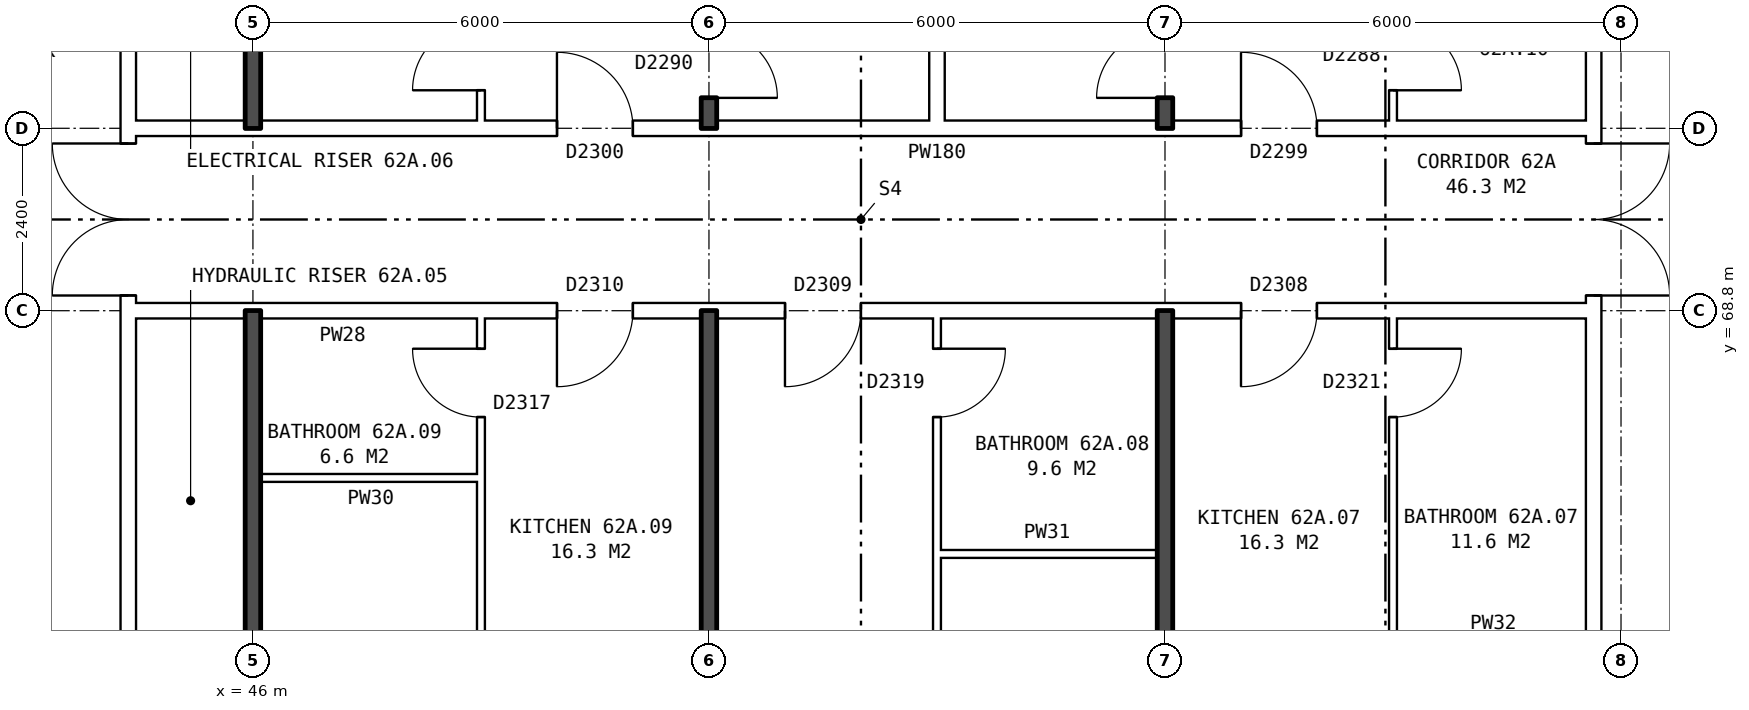
"""IFC4 building model, lengths in metres.
Left out: names, types, materials, properties, quantities, classifications, styles, units other than length and angle.
Written with IfcOpenShell. Run it as: python <this file> out.ifc"""

import sys

from ifc_helpers import new_model, si_unit, direction, frame, frame_2d, origin, place, context, subcontext, project, spatial, rectangle, extrude, element, fill, save


model = new_model("IFC4")
c1 = context("Model", 3, precision=1e-05, world=origin(), true_north=direction((0.0, 1.0)))
c2 = subcontext(c1, "Body", "Model", "MODEL_VIEW")
j1 = project(units=[si_unit("LENGTHUNIT", "METRE"), si_unit("PLANEANGLEUNIT", "RADIAN")], contexts=[c1])
p1 = place(None, origin())
s1 = spatial("IfcSite", under=j1, at=p1, CompositionType="ELEMENT")
p2 = place(p1, origin())
s2 = spatial("IfcBuilding", under=s1, at=p2, CompositionType="ELEMENT")
p3 = place(p2, frame((0.0, 0.0, 221.4)))
s3 = spatial("IfcBuildingStorey", under=s2, at=p3, CompositionType="ELEMENT", Elevation=221.4)
p4 = place(p3, frame((63.64, 63.9, 0.0), z_axis=(0.0, 0.0, 1.0), x_axis=(0.0, 1.0, 0.0)))
e1 = element("IfcWall", 1, at=p4, inside=s3, PredefinedType="PARTITIONING", context=c2, shape_type="SweptSolid", body=[
    extrude(rectangle(XDim=12.2, YDim=0.2, at=frame_2d((6.1, 0.0))), origin(), (0.0, 0.0, 1.0), 2.85),
])
p5 = place(p4, frame((5.1, 0.0, 0.0)))
e2 = element("IfcOpeningElement", 2, at=p5, cuts=e1, PredefinedType="OPENING", context=c2, shape_type="SweptSolid", body=[
    extrude(rectangle(XDim=2.0, YDim=2.1, at=frame_2d((1.0, 1.05))), frame((0.0, 0.11, 0.0), z_axis=(0.0, -1.0, 0.0), x_axis=(1.0, 0.0, 0.0)), (0.0, 0.0, 1.0), 0.22),
])
p6 = place(p3, frame((44.36, 63.9, 0.0), z_axis=(0.0, 0.0, 1.0), x_axis=(0.0, 1.0, 0.0)))
e3 = element("IfcWall", 3, at=p6, inside=s3, PredefinedType="PARTITIONING", context=c2, shape_type="SweptSolid", body=[
    extrude(rectangle(XDim=12.2, YDim=0.2, at=frame_2d((6.1, 0.0))), origin(), (0.0, 0.0, 1.0), 2.85),
])
p7 = place(p6, frame((5.1, 0.0, 0.0)))
e4 = element("IfcOpeningElement", 4, at=p7, cuts=e3, PredefinedType="OPENING", context=c2, shape_type="SweptSolid", body=[
    extrude(rectangle(XDim=2.0, YDim=2.1, at=frame_2d((1.0, 1.05))), frame((0.0, 0.11, 0.0), z_axis=(0.0, -1.0, 0.0), x_axis=(1.0, 0.0, 0.0)), (0.0, 0.0, 1.0), 0.22),
])
for number, where, z_axis, x_axis in (
    (5, (55.0, 65.6, 0.0), (0.0, 0.0, 1.0), (1.0, 0.0, 0.0)),
    (6, (46.1, 66.6, 0.0), (0.0, 0.0, 1.0), (1.0, 0.0, 0.0)),
):
    element("IfcWall", number, at=place(p3, frame(where, z_axis=z_axis, x_axis=x_axis)), inside=s3, PredefinedType="PARTITIONING", context=c2, shape_type="SweptSolid", body=[
        extrude(rectangle(XDim=2.9, YDim=0.1, at=frame_2d((1.45, 0.0))), origin(), (0.0, 0.0, 1.0), 2.85),
    ])
p8 = place(p3, frame((44.36, 68.8, 0.0), z_axis=(0.0, 0.0, 1.0), x_axis=(1.0, 0.0, 0.0)))
e7 = element("IfcWall", 7, at=p8, inside=s3, PredefinedType="PARTITIONING", context=c2, shape_type="SweptSolid", body=[
    extrude(rectangle(XDim=19.28, YDim=0.2, at=frame_2d((9.64, 0.0))), origin(), (0.0, 0.0, 1.0), 2.85),
])
p9 = place(p8, frame((14.64, 0.0, 0.0)))
e8 = element("IfcOpeningElement", 8, at=p9, cuts=e7, PredefinedType="OPENING", context=c2, shape_type="SweptSolid", body=[
    extrude(rectangle(XDim=1.0, YDim=2.1, at=frame_2d((0.5, 1.05))), frame((0.0, 0.11, 0.0), z_axis=(0.0, -1.0, 0.0), x_axis=(1.0, 0.0, 0.0)), (0.0, 0.0, 1.0), 0.22),
])
p10 = place(p8, frame((8.64, 0.0, 0.0)))
e9 = element("IfcOpeningElement", 9, at=p10, cuts=e7, PredefinedType="OPENING", context=c2, shape_type="SweptSolid", body=[
    extrude(rectangle(XDim=1.0, YDim=2.1, at=frame_2d((0.5, 1.05))), frame((0.0, 0.11, 0.0), z_axis=(0.0, -1.0, 0.0), x_axis=(1.0, 0.0, 0.0)), (0.0, 0.0, 1.0), 0.22),
])
p11 = place(p8, frame((5.64, 0.0, 0.0)))
e10 = element("IfcOpeningElement", 10, at=p11, cuts=e7, PredefinedType="OPENING", context=c2, shape_type="SweptSolid", body=[
    extrude(rectangle(XDim=1.0, YDim=2.1, at=frame_2d((0.5, 1.05))), frame((0.0, 0.11, 0.0), z_axis=(0.0, -1.0, 0.0), x_axis=(1.0, 0.0, 0.0)), (0.0, 0.0, 1.0), 0.22),
])
p12 = place(p3, frame((44.36, 71.2, 0.0), z_axis=(0.0, 0.0, 1.0), x_axis=(1.0, 0.0, 0.0)))
e11 = element("IfcWall", 11, at=p12, inside=s3, PredefinedType="PARTITIONING", context=c2, shape_type="SweptSolid", body=[
    extrude(rectangle(XDim=19.28, YDim=0.2, at=frame_2d((9.64, 0.0))), origin(), (0.0, 0.0, 1.0), 2.85),
])
p13 = place(p12, frame((14.64, 0.0, 0.0)))
e12 = element("IfcOpeningElement", 12, at=p13, cuts=e11, PredefinedType="OPENING", context=c2, shape_type="SweptSolid", body=[
    extrude(rectangle(XDim=1.0, YDim=2.1, at=frame_2d((0.5, 1.05))), frame((0.0, 0.11, 0.0), z_axis=(0.0, -1.0, 0.0), x_axis=(1.0, 0.0, 0.0)), (0.0, 0.0, 1.0), 0.22),
])
p14 = place(p12, frame((5.64, 0.0, 0.0)))
e13 = element("IfcOpeningElement", 13, at=p14, cuts=e11, PredefinedType="OPENING", context=c2, shape_type="SweptSolid", body=[
    extrude(rectangle(XDim=1.0, YDim=2.1, at=frame_2d((0.5, 1.05))), frame((0.0, 0.11, 0.0), z_axis=(0.0, -1.0, 0.0), x_axis=(1.0, 0.0, 0.0)), (0.0, 0.0, 1.0), 0.22),
])
for number, where, z_axis, x_axis in (
    (14, (46.0, 54.36, 0.0), (0.0, 0.0, 1.0), (0.0, 1.0, 0.0)),
    (15, (46.0, 71.2, 0.0), (0.0, 0.0, 1.0), (0.0, 1.0, 0.0)),
):
    element("IfcWall", number, at=place(p3, frame(where, z_axis=z_axis, x_axis=x_axis)), inside=s3, PredefinedType="SOLIDWALL", context=c2, shape_type="SweptSolid", body=[
        extrude(rectangle(XDim=14.44, YDim=0.2, at=frame_2d((7.22, 0.0))), origin(), (0.0, 0.0, 1.0), 2.85),
    ])
p15 = place(p3, frame((49.0, 54.36, 0.0), z_axis=(0.0, 0.0, 1.0), x_axis=(0.0, 1.0, 0.0)))
e16 = element("IfcWall", 16, at=p15, inside=s3, PredefinedType="PARTITIONING", context=c2, shape_type="SweptSolid", body=[
    extrude(rectangle(XDim=14.34, YDim=0.1, at=frame_2d((7.17, 0.0))), origin(), (0.0, 0.0, 1.0), 2.85),
])
p16 = place(p15, frame((7.7, 0.0, 0.0)))
e17 = element("IfcOpeningElement", 17, at=p16, cuts=e16, PredefinedType="OPENING", context=c2, shape_type="SweptSolid", body=[
    extrude(rectangle(XDim=0.9, YDim=2.1, at=frame_2d((0.45, 1.05))), frame((0.0, 0.06, 0.0), z_axis=(0.0, -1.0, 0.0), x_axis=(1.0, 0.0, 0.0)), (0.0, 0.0, 1.0), 0.12),
])
p17 = place(p15, frame((13.04, 0.0, 0.0)))
e18 = element("IfcOpeningElement", 18, at=p17, cuts=e16, PredefinedType="OPENING", context=c2, shape_type="SweptSolid", body=[
    extrude(rectangle(XDim=0.9, YDim=2.1, at=frame_2d((0.45, 1.05))), frame((0.0, 0.06, 0.0), z_axis=(0.0, -1.0, 0.0), x_axis=(1.0, 0.0, 0.0)), (0.0, 0.0, 1.0), 0.12),
])
p18 = place(p3, frame((49.0, 71.3, 0.0), z_axis=(0.0, 0.0, 1.0), x_axis=(0.0, 1.0, 0.0)))
e19 = element("IfcWall", 19, at=p18, inside=s3, PredefinedType="PARTITIONING", context=c2, shape_type="SweptSolid", body=[
    extrude(rectangle(XDim=14.34, YDim=0.1, at=frame_2d((7.17, 0.0))), origin(), (0.0, 0.0, 1.0), 2.85),
])
p19 = place(p18, frame((5.74, 0.0, 0.0)))
e20 = element("IfcOpeningElement", 20, at=p19, cuts=e19, PredefinedType="OPENING", context=c2, shape_type="SweptSolid", body=[
    extrude(rectangle(XDim=0.9, YDim=2.1, at=frame_2d((0.45, 1.05))), frame((0.0, 0.06, 0.0), z_axis=(0.0, -1.0, 0.0), x_axis=(1.0, 0.0, 0.0)), (0.0, 0.0, 1.0), 0.12),
])
p20 = place(p18, frame((0.4, 0.0, 0.0)))
e21 = element("IfcOpeningElement", 21, at=p20, cuts=e19, PredefinedType="OPENING", context=c2, shape_type="SweptSolid", body=[
    extrude(rectangle(XDim=0.9, YDim=2.1, at=frame_2d((0.45, 1.05))), frame((0.0, 0.06, 0.0), z_axis=(0.0, -1.0, 0.0), x_axis=(1.0, 0.0, 0.0)), (0.0, 0.0, 1.0), 0.12),
])
p21 = place(p3, frame((52.0, 54.36, 0.0), z_axis=(0.0, 0.0, 1.0), x_axis=(0.0, 1.0, 0.0)))
e22 = element("IfcWall", 22, at=p21, inside=s3, PredefinedType="SOLIDWALL", context=c2, shape_type="SweptSolid", body=[
    extrude(rectangle(XDim=14.44, YDim=0.2, at=frame_2d((7.22, 0.0))), origin(), (0.0, 0.0, 1.0), 2.85),
])
p22 = place(p3, frame((52.0, 71.2, 0.0), z_axis=(0.0, 0.0, 1.0), x_axis=(0.0, 1.0, 0.0)))
e23 = element("IfcWall", 23, at=p22, inside=s3, PredefinedType="SOLIDWALL", context=c2, shape_type="SweptSolid", body=[
    extrude(rectangle(XDim=14.44, YDim=0.2, at=frame_2d((7.22, 0.0))), origin(), (0.0, 0.0, 1.0), 2.85),
])
p23 = place(p22, frame((5.84, 0.0, 0.0)))
e24 = element("IfcOpeningElement", 24, at=p23, cuts=e23, PredefinedType="OPENING", context=c2, shape_type="SweptSolid", body=[
    extrude(rectangle(XDim=0.9, YDim=2.1, at=frame_2d((0.45, 1.05))), frame((0.0, 0.11, 0.0), z_axis=(0.0, -1.0, 0.0), x_axis=(1.0, 0.0, 0.0)), (0.0, 0.0, 1.0), 0.22),
])
p24 = place(p22, frame((0.4, 0.0, 0.0)))
e25 = element("IfcOpeningElement", 25, at=p24, cuts=e23, PredefinedType="OPENING", context=c2, shape_type="SweptSolid", body=[
    extrude(rectangle(XDim=0.9, YDim=2.1, at=frame_2d((0.45, 1.05))), frame((0.0, 0.11, 0.0), z_axis=(0.0, -1.0, 0.0), x_axis=(1.0, 0.0, 0.0)), (0.0, 0.0, 1.0), 0.22),
])
p25 = place(p3, frame((55.0, 54.36, 0.0), z_axis=(0.0, 0.0, 1.0), x_axis=(0.0, 1.0, 0.0)))
e26 = element("IfcWall", 26, at=p25, inside=s3, PredefinedType="PARTITIONING", context=c2, shape_type="SweptSolid", body=[
    extrude(rectangle(XDim=14.34, YDim=0.1, at=frame_2d((7.17, 0.0))), origin(), (0.0, 0.0, 1.0), 2.85),
])
p26 = place(p25, frame((4.2, 0.0, 0.0)))
e27 = element("IfcOpeningElement", 27, at=p26, cuts=e26, PredefinedType="OPENING", context=c2, shape_type="SweptSolid", body=[
    extrude(rectangle(XDim=0.9, YDim=2.1, at=frame_2d((0.45, 1.05))), frame((0.0, 0.06, 0.0), z_axis=(0.0, -1.0, 0.0), x_axis=(1.0, 0.0, 0.0)), (0.0, 0.0, 1.0), 0.12),
])
p27 = place(p25, frame((13.04, 0.0, 0.0)))
e28 = element("IfcOpeningElement", 28, at=p27, cuts=e26, PredefinedType="OPENING", context=c2, shape_type="SweptSolid", body=[
    extrude(rectangle(XDim=0.9, YDim=2.1, at=frame_2d((0.45, 1.05))), frame((0.0, 0.06, 0.0), z_axis=(0.0, -1.0, 0.0), x_axis=(1.0, 0.0, 0.0)), (0.0, 0.0, 1.0), 0.12),
])
p28 = place(p3, frame((55.0, 71.3, 0.0), z_axis=(0.0, 0.0, 1.0), x_axis=(0.0, 1.0, 0.0)))
e29 = element("IfcWall", 29, at=p28, inside=s3, PredefinedType="PARTITIONING", context=c2, shape_type="SweptSolid", body=[
    extrude(rectangle(XDim=14.34, YDim=0.2, at=frame_2d((7.17, 0.0))), origin(), (0.0, 0.0, 1.0), 2.85),
])
p29 = place(p3, frame((58.0, 54.36, 0.0), z_axis=(0.0, 0.0, 1.0), x_axis=(0.0, 1.0, 0.0)))
e30 = element("IfcWall", 30, at=p29, inside=s3, PredefinedType="SOLIDWALL", context=c2, shape_type="SweptSolid", body=[
    extrude(rectangle(XDim=14.44, YDim=0.2, at=frame_2d((7.22, 0.0))), origin(), (0.0, 0.0, 1.0), 2.85),
])
p30 = place(p3, frame((58.0, 71.2, 0.0), z_axis=(0.0, 0.0, 1.0), x_axis=(0.0, 1.0, 0.0)))
e31 = element("IfcWall", 31, at=p30, inside=s3, PredefinedType="SOLIDWALL", context=c2, shape_type="SweptSolid", body=[
    extrude(rectangle(XDim=14.44, YDim=0.2, at=frame_2d((7.22, 0.0))), origin(), (0.0, 0.0, 1.0), 2.85),
])
p31 = place(p30, frame((8.04, 0.0, 0.0)))
e32 = element("IfcOpeningElement", 32, at=p31, cuts=e31, PredefinedType="OPENING", context=c2, shape_type="SweptSolid", body=[
    extrude(rectangle(XDim=0.9, YDim=2.1, at=frame_2d((0.45, 1.05))), frame((0.0, 0.11, 0.0), z_axis=(0.0, -1.0, 0.0), x_axis=(1.0, 0.0, 0.0)), (0.0, 0.0, 1.0), 0.22),
])
p32 = place(p30, frame((0.4, 0.0, 0.0)))
e33 = element("IfcOpeningElement", 33, at=p32, cuts=e31, PredefinedType="OPENING", context=c2, shape_type="SweptSolid", body=[
    extrude(rectangle(XDim=0.9, YDim=2.1, at=frame_2d((0.45, 1.05))), frame((0.0, 0.11, 0.0), z_axis=(0.0, -1.0, 0.0), x_axis=(1.0, 0.0, 0.0)), (0.0, 0.0, 1.0), 0.22),
])
p33 = place(p3, frame((61.0, 54.36, 0.0), z_axis=(0.0, 0.0, 1.0), x_axis=(0.0, 1.0, 0.0)))
e34 = element("IfcWall", 34, at=p33, inside=s3, PredefinedType="PARTITIONING", context=c2, shape_type="SweptSolid", body=[
    extrude(rectangle(XDim=14.34, YDim=0.1, at=frame_2d((7.17, 0.0))), origin(), (0.0, 0.0, 1.0), 2.85),
])
p34 = place(p33, frame((7.7, 0.0, 0.0)))
e35 = element("IfcOpeningElement", 35, at=p34, cuts=e34, PredefinedType="OPENING", context=c2, shape_type="SweptSolid", body=[
    extrude(rectangle(XDim=0.9, YDim=2.1, at=frame_2d((0.45, 1.05))), frame((0.0, 0.06, 0.0), z_axis=(0.0, -1.0, 0.0), x_axis=(1.0, 0.0, 0.0)), (0.0, 0.0, 1.0), 0.12),
])
p35 = place(p33, frame((13.04, 0.0, 0.0)))
e36 = element("IfcOpeningElement", 36, at=p35, cuts=e34, PredefinedType="OPENING", context=c2, shape_type="SweptSolid", body=[
    extrude(rectangle(XDim=0.9, YDim=2.1, at=frame_2d((0.45, 1.05))), frame((0.0, 0.06, 0.0), z_axis=(0.0, -1.0, 0.0), x_axis=(1.0, 0.0, 0.0)), (0.0, 0.0, 1.0), 0.12),
])
p36 = place(p3, frame((61.0, 71.3, 0.0), z_axis=(0.0, 0.0, 1.0), x_axis=(0.0, 1.0, 0.0)))
e37 = element("IfcWall", 37, at=p36, inside=s3, PredefinedType="PARTITIONING", context=c2, shape_type="SweptSolid", body=[
    extrude(rectangle(XDim=14.34, YDim=0.1, at=frame_2d((7.17, 0.0))), origin(), (0.0, 0.0, 1.0), 2.85),
])
p37 = place(p36, frame((7.94, 0.0, 0.0)))
e38 = element("IfcOpeningElement", 38, at=p37, cuts=e37, PredefinedType="OPENING", context=c2, shape_type="SweptSolid", body=[
    extrude(rectangle(XDim=0.9, YDim=2.1, at=frame_2d((0.45, 1.05))), frame((0.0, 0.06, 0.0), z_axis=(0.0, -1.0, 0.0), x_axis=(1.0, 0.0, 0.0)), (0.0, 0.0, 1.0), 0.12),
])
p38 = place(p36, frame((0.4, 0.0, 0.0)))
e39 = element("IfcOpeningElement", 39, at=p38, cuts=e37, PredefinedType="OPENING", context=c2, shape_type="SweptSolid", body=[
    extrude(rectangle(XDim=0.9, YDim=2.1, at=frame_2d((0.45, 1.05))), frame((0.0, 0.06, 0.0), z_axis=(0.0, -1.0, 0.0), x_axis=(1.0, 0.0, 0.0)), (0.0, 0.0, 1.0), 0.12),
])
p39 = place(p5, frame((2.0, 0.0, 0.0), z_axis=(0.0, 0.0, 1.0), x_axis=(-1.0, 0.0, 0.0)))
e40 = element("IfcDoor", 40, at=p39, inside=s3, OperationType="DOUBLE_DOOR_SINGLE_SWING", PredefinedType="DOOR", context=c2, shape_type="SweptSolid", body=[
    extrude(rectangle(XDim=2.0, YDim=2.1, at=frame_2d((1.0, 1.05))), frame((0.0, 0.025, 0.0), z_axis=(0.0, -1.0, 0.0), x_axis=(1.0, 0.0, 0.0)), (0.0, 0.0, 1.0), 0.05),
])
fill(e2, e40)
p40 = place(p7, origin())
e41 = element("IfcDoor", 41, at=p40, inside=s3, OperationType="DOUBLE_DOOR_SINGLE_SWING", PredefinedType="DOOR", context=c2, shape_type="SweptSolid", body=[
    extrude(rectangle(XDim=2.0, YDim=2.1, at=frame_2d((1.0, 1.05))), frame((0.0, 0.025, 0.0), z_axis=(0.0, -1.0, 0.0), x_axis=(1.0, 0.0, 0.0)), (0.0, 0.0, 1.0), 0.05),
])
fill(e4, e41)
p41 = place(p9, frame((1.0, 0.0, 0.0), z_axis=(0.0, 0.0, 1.0), x_axis=(-1.0, 0.0, 0.0)))
e42 = element("IfcDoor", 42, at=p41, inside=s3, OperationType="SINGLE_SWING_RIGHT", PredefinedType="DOOR", context=c2, shape_type="SweptSolid", body=[
    extrude(rectangle(XDim=1.0, YDim=2.1, at=frame_2d((0.5, 1.05))), frame((0.0, 0.025, 0.0), z_axis=(0.0, -1.0, 0.0), x_axis=(1.0, 0.0, 0.0)), (0.0, 0.0, 1.0), 0.05),
])
fill(e8, e42)
p42 = place(p35, frame((0.9, 0.0, 0.0), z_axis=(0.0, 0.0, 1.0), x_axis=(-1.0, 0.0, 0.0)))
e43 = element("IfcDoor", 43, at=p42, inside=s3, OperationType="SINGLE_SWING_LEFT", PredefinedType="DOOR", context=c2, shape_type="SweptSolid", body=[
    extrude(rectangle(XDim=0.9, YDim=2.1, at=frame_2d((0.45, 1.05))), frame((0.0, 0.025, 0.0), z_axis=(0.0, -1.0, 0.0), x_axis=(1.0, 0.0, 0.0)), (0.0, 0.0, 1.0), 0.05),
])
fill(e36, e43)
p43 = place(p10, frame((1.0, 0.0, 0.0), z_axis=(0.0, 0.0, 1.0), x_axis=(-1.0, 0.0, 0.0)))
e44 = element("IfcDoor", 44, at=p43, inside=s3, OperationType="SINGLE_SWING_RIGHT", PredefinedType="DOOR", context=c2, shape_type="SweptSolid", body=[
    extrude(rectangle(XDim=1.0, YDim=2.1, at=frame_2d((0.5, 1.05))), frame((0.0, 0.025, 0.0), z_axis=(0.0, -1.0, 0.0), x_axis=(1.0, 0.0, 0.0)), (0.0, 0.0, 1.0), 0.05),
])
fill(e9, e44)
p44 = place(p27, frame((0.9, 0.0, 0.0), z_axis=(0.0, 0.0, 1.0), x_axis=(-1.0, 0.0, 0.0)))
e45 = element("IfcDoor", 45, at=p44, inside=s3, OperationType="SINGLE_SWING_LEFT", PredefinedType="DOOR", context=c2, shape_type="SweptSolid", body=[
    extrude(rectangle(XDim=0.9, YDim=2.1, at=frame_2d((0.45, 1.05))), frame((0.0, 0.025, 0.0), z_axis=(0.0, -1.0, 0.0), x_axis=(1.0, 0.0, 0.0)), (0.0, 0.0, 1.0), 0.05),
])
fill(e28, e45)
p45 = place(p11, frame((1.0, 0.0, 0.0), z_axis=(0.0, 0.0, 1.0), x_axis=(-1.0, 0.0, 0.0)))
e46 = element("IfcDoor", 46, at=p45, inside=s3, OperationType="SINGLE_SWING_RIGHT", PredefinedType="DOOR", context=c2, shape_type="SweptSolid", body=[
    extrude(rectangle(XDim=1.0, YDim=2.1, at=frame_2d((0.5, 1.05))), frame((0.0, 0.025, 0.0), z_axis=(0.0, -1.0, 0.0), x_axis=(1.0, 0.0, 0.0)), (0.0, 0.0, 1.0), 0.05),
])
fill(e10, e46)
p46 = place(p17, origin())
e47 = element("IfcDoor", 47, at=p46, inside=s3, OperationType="SINGLE_SWING_RIGHT", PredefinedType="DOOR", context=c2, shape_type="SweptSolid", body=[
    extrude(rectangle(XDim=0.9, YDim=2.1, at=frame_2d((0.45, 1.05))), frame((0.0, 0.025, 0.0), z_axis=(0.0, -1.0, 0.0), x_axis=(1.0, 0.0, 0.0)), (0.0, 0.0, 1.0), 0.05),
])
fill(e18, e47)
p47 = place(p13, origin())
e48 = element("IfcDoor", 48, at=p47, inside=s3, OperationType="SINGLE_SWING_LEFT", PredefinedType="DOOR", context=c2, shape_type="SweptSolid", body=[
    extrude(rectangle(XDim=1.0, YDim=2.1, at=frame_2d((0.5, 1.05))), frame((0.0, 0.025, 0.0), z_axis=(0.0, -1.0, 0.0), x_axis=(1.0, 0.0, 0.0)), (0.0, 0.0, 1.0), 0.05),
])
fill(e12, e48)
p48 = place(p38, frame((0.9, 0.0, 0.0), z_axis=(0.0, 0.0, 1.0), x_axis=(-1.0, 0.0, 0.0)))
e49 = element("IfcDoor", 49, at=p48, inside=s3, OperationType="SINGLE_SWING_RIGHT", PredefinedType="DOOR", context=c2, shape_type="SweptSolid", body=[
    extrude(rectangle(XDim=0.9, YDim=2.1, at=frame_2d((0.45, 1.05))), frame((0.0, 0.025, 0.0), z_axis=(0.0, -1.0, 0.0), x_axis=(1.0, 0.0, 0.0)), (0.0, 0.0, 1.0), 0.05),
])
fill(e39, e49)
p49 = place(p32, origin())
e50 = element("IfcDoor", 50, at=p49, inside=s3, OperationType="SINGLE_SWING_LEFT", PredefinedType="DOOR", context=c2, shape_type="SweptSolid", body=[
    extrude(rectangle(XDim=0.9, YDim=2.1, at=frame_2d((0.45, 1.05))), frame((0.0, 0.025, 0.0), z_axis=(0.0, -1.0, 0.0), x_axis=(1.0, 0.0, 0.0)), (0.0, 0.0, 1.0), 0.05),
])
fill(e33, e50)
p50 = place(p14, origin())
e51 = element("IfcDoor", 51, at=p50, inside=s3, OperationType="SINGLE_SWING_LEFT", PredefinedType="DOOR", context=c2, shape_type="SweptSolid", body=[
    extrude(rectangle(XDim=1.0, YDim=2.1, at=frame_2d((0.5, 1.05))), frame((0.0, 0.025, 0.0), z_axis=(0.0, -1.0, 0.0), x_axis=(1.0, 0.0, 0.0)), (0.0, 0.0, 1.0), 0.05),
])
fill(e13, e51)
p51 = place(p24, frame((0.9, 0.0, 0.0), z_axis=(0.0, 0.0, 1.0), x_axis=(-1.0, 0.0, 0.0)))
e52 = element("IfcDoor", 52, at=p51, inside=s3, OperationType="SINGLE_SWING_RIGHT", PredefinedType="DOOR", context=c2, shape_type="SweptSolid", body=[
    extrude(rectangle(XDim=0.9, YDim=2.1, at=frame_2d((0.45, 1.05))), frame((0.0, 0.025, 0.0), z_axis=(0.0, -1.0, 0.0), x_axis=(1.0, 0.0, 0.0)), (0.0, 0.0, 1.0), 0.05),
])
fill(e25, e52)
p52 = place(p20, origin())
e53 = element("IfcDoor", 53, at=p52, inside=s3, OperationType="SINGLE_SWING_LEFT", PredefinedType="DOOR", context=c2, shape_type="SweptSolid", body=[
    extrude(rectangle(XDim=0.9, YDim=2.1, at=frame_2d((0.45, 1.05))), frame((0.0, 0.025, 0.0), z_axis=(0.0, -1.0, 0.0), x_axis=(1.0, 0.0, 0.0)), (0.0, 0.0, 1.0), 0.05),
])
fill(e21, e53)
save(model, sys.argv[1])
